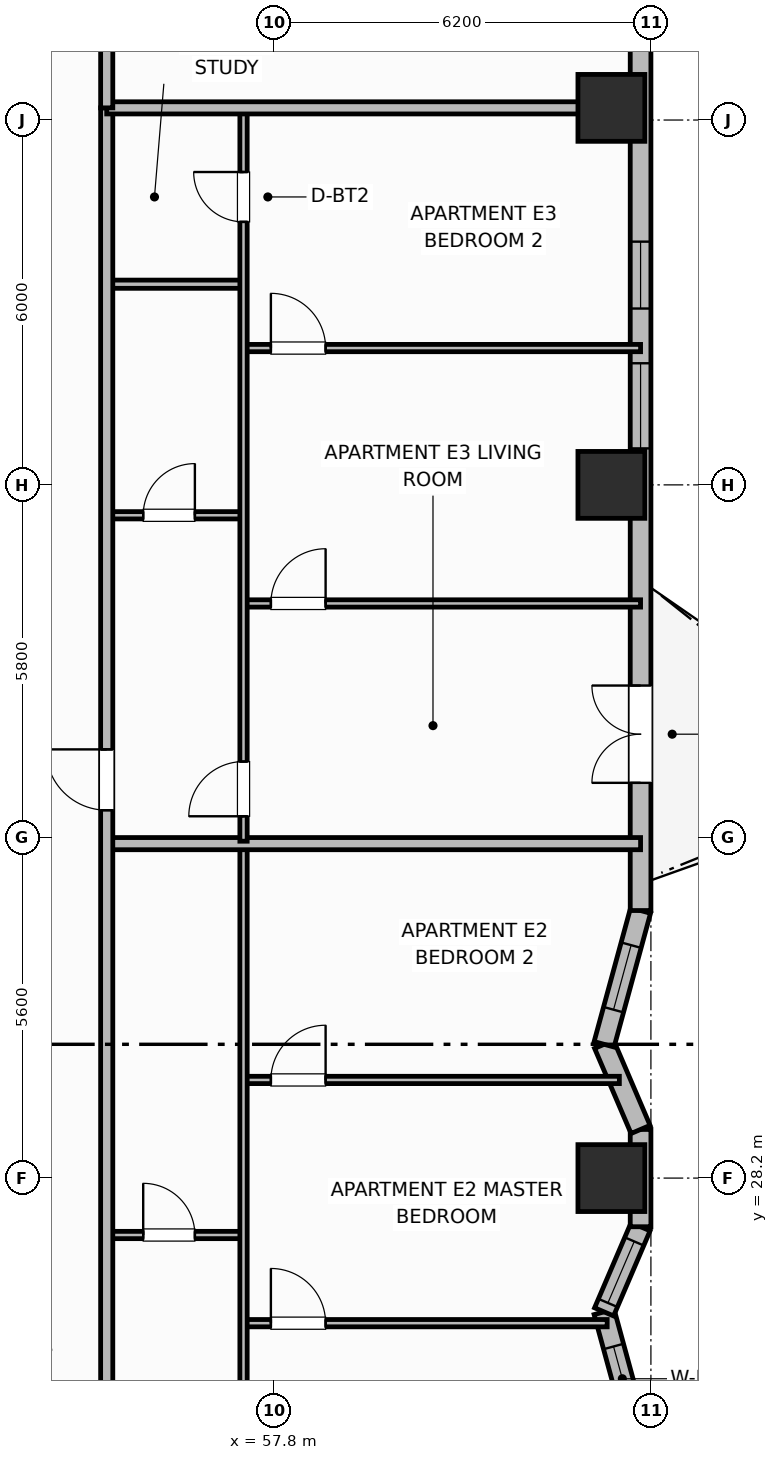
"""IFC4 building model, lengths in metres.
Left out: names, types, materials, properties, quantities, classifications, styles, units other than length and angle.
Written with IfcOpenShell. Run it as: python <this file> out.ifc"""

import sys

from ifc_helpers import new_model, si_unit, direction, frame, frame_2d, origin, origin_2d, place, context, subcontext, project, spatial, rectangle, extrude, element, fill, save


model = new_model("IFC4")
c1 = context("Model", 3, precision=1e-05, world=origin(), true_north=direction((0.0, 1.0)))
c2 = subcontext(c1, "Body", "Model", "MODEL_VIEW")
j1 = project(units=[si_unit("LENGTHUNIT", "METRE"), si_unit("PLANEANGLEUNIT", "RADIAN")], contexts=[c1])
p1 = place(None, origin())
s1 = spatial("IfcSite", under=j1, at=p1, CompositionType="ELEMENT")
p2 = place(p1, origin())
s2 = spatial("IfcBuilding", under=s1, at=p2, CompositionType="ELEMENT")
p3 = place(p2, frame((0.0, 0.0, 88.3)))
s3 = spatial("IfcBuildingStorey", under=s2, at=p3, CompositionType="ELEMENT", Elevation=88.3)
for number, where, z_axis, x_axis in (
    (1, (63.35, 28.2, 0.0), (0.0, 0.0, 1.0), (1.0, 0.0, 0.0)),
    (2, (63.35, 39.6, 0.0), (0.0, 0.0, 1.0), (1.0, 0.0, 0.0)),
    (3, (63.35, 45.8, 0.0), (0.0, 0.0, 1.0), (1.0, 0.0, 0.0)),
):
    element("IfcColumn", number, at=place(p3, frame(where, z_axis=z_axis, x_axis=x_axis)), inside=s3, PredefinedType="COLUMN", context=c2, shape_type="SweptSolid", body=[
        extrude(rectangle(XDim=1.1, YDim=1.1, at=origin_2d()), origin(), (0.0, 0.0, 1.0), 3.7),
    ])
p4 = place(p3, frame((63.83, 23.8, 0.0), z_axis=(0.0, 0.0, 1.0), x_axis=(-0.263162701705, 0.964751466665, 0.0)))
e4 = element("IfcWall", 4, at=p4, inside=s3, PredefinedType="SOLIDWALL", context=c2, shape_type="SweptSolid", body=[
    extrude(rectangle(XDim=2.28, YDim=0.34, at=frame_2d((1.14, 0.0))), origin(), (0.0, 0.0, 1.0), 2.7),
])
p5 = place(p4, frame((0.59, 0.0, 0.89)))
e5 = element("IfcOpeningElement", 5, at=p5, cuts=e4, PredefinedType="OPENING", context=c2, shape_type="SweptSolid", body=[
    extrude(rectangle(XDim=1.1, YDim=1.65, at=frame_2d((0.55, 0.825))), frame((0.0, 0.18, 0.0), z_axis=(0.0, -1.0, 0.0), x_axis=(1.0, 0.0, 0.0)), (0.0, 0.0, 1.0), 0.36),
])
p6 = place(p3, frame((63.23, 26.0, 0.0), z_axis=(0.0, 0.0, 1.0), x_axis=(0.39399667932, 0.919111862988, 0.0)))
e6 = element("IfcWall", 6, at=p6, inside=s3, PredefinedType="SOLIDWALL", context=c2, shape_type="SweptSolid", body=[
    extrude(rectangle(XDim=1.523, YDim=0.34, at=frame_2d((0.762, 0.0))), origin(), (0.0, 0.0, 1.0), 2.7),
])
p7 = place(p6, frame((0.16, 0.0, 0.89)))
e7 = element("IfcOpeningElement", 7, at=p7, cuts=e6, PredefinedType="OPENING", context=c2, shape_type="SweptSolid", body=[
    extrude(rectangle(XDim=1.1, YDim=1.65, at=frame_2d((0.55, 0.825))), frame((0.0, 0.18, 0.0), z_axis=(0.0, -1.0, 0.0), x_axis=(1.0, 0.0, 0.0)), (0.0, 0.0, 1.0), 0.36),
])
p8 = place(p3, frame((63.83, 27.4, 0.0), z_axis=(0.0, 0.0, 1.0), x_axis=(0.0, 1.0, 0.0)))
e8 = element("IfcWall", 8, at=p8, inside=s3, PredefinedType="SOLIDWALL", context=c2, shape_type="SweptSolid", body=[
    extrude(rectangle(XDim=1.6, YDim=0.34, at=frame_2d((0.8, 0.0))), origin(), (0.0, 0.0, 1.0), 2.7),
])
p9 = place(p3, frame((63.83, 29.0, 0.0), z_axis=(0.0, 0.0, 1.0), x_axis=(-0.39399667932, 0.919111862988, 0.0)))
e9 = element("IfcWall", 9, at=p9, inside=s3, PredefinedType="SOLIDWALL", context=c2, shape_type="SweptSolid", body=[
    extrude(rectangle(XDim=1.523, YDim=0.34, at=frame_2d((0.762, 0.0))), origin(), (0.0, 0.0, 1.0), 2.7),
])
p10 = place(p3, frame((63.23, 30.4, 0.0), z_axis=(0.0, 0.0, 1.0), x_axis=(0.263135522356, 0.964758880174, 0.0)))
e10 = element("IfcWall", 10, at=p10, inside=s3, PredefinedType="SOLIDWALL", context=c2, shape_type="SweptSolid", body=[
    extrude(rectangle(XDim=2.281, YDim=0.34, at=frame_2d((1.14, 0.0))), origin(), (0.0, 0.0, 1.0), 2.7),
])
p11 = place(p10, frame((0.59, 0.0, 0.89)))
e11 = element("IfcOpeningElement", 11, at=p11, cuts=e10, PredefinedType="OPENING", context=c2, shape_type="SweptSolid", body=[
    extrude(rectangle(XDim=1.1, YDim=1.65, at=frame_2d((0.55, 0.825))), frame((0.0, 0.18, 0.0), z_axis=(0.0, -1.0, 0.0), x_axis=(1.0, 0.0, 0.0)), (0.0, 0.0, 1.0), 0.36),
])
p12 = place(p3, frame((63.83, 32.6, 0.0), z_axis=(0.0, 0.0, 1.0), x_axis=(0.0, 1.0, 0.0)))
e12 = element("IfcWall", 12, at=p12, inside=s3, PredefinedType="SOLIDWALL", context=c2, shape_type="SweptSolid", body=[
    extrude(rectangle(XDim=14.8, YDim=0.34, at=frame_2d((7.4, 0.0))), origin(), (0.0, 0.0, 1.0), 2.7),
])
p13 = place(p12, frame((2.1, 0.0, 0.0)))
e13 = element("IfcOpeningElement", 13, at=p13, cuts=e12, PredefinedType="OPENING", context=c2, shape_type="SweptSolid", body=[
    extrude(rectangle(XDim=1.6, YDim=2.1, at=frame_2d((0.8, 1.05))), frame((0.0, 0.18, 0.0), z_axis=(0.0, -1.0, 0.0), x_axis=(1.0, 0.0, 0.0)), (0.0, 0.0, 1.0), 0.36),
])
p14 = place(p12, frame((7.6, 0.0, 0.69)))
e14 = element("IfcOpeningElement", 14, at=p14, cuts=e12, PredefinedType="OPENING", context=c2, shape_type="SweptSolid", body=[
    extrude(rectangle(XDim=1.4, YDim=1.85, at=frame_2d((0.7, 0.925))), frame((0.0, 0.18, 0.0), z_axis=(0.0, -1.0, 0.0), x_axis=(1.0, 0.0, 0.0)), (0.0, 0.0, 1.0), 0.36),
])
p15 = place(p12, frame((9.9, 0.0, 0.93)))
e15 = element("IfcOpeningElement", 15, at=p15, cuts=e12, PredefinedType="OPENING", context=c2, shape_type="SweptSolid", body=[
    extrude(rectangle(XDim=1.1, YDim=1.65, at=frame_2d((0.55, 0.825))), frame((0.0, 0.18, 0.0), z_axis=(0.0, -1.0, 0.0), x_axis=(1.0, 0.0, 0.0)), (0.0, 0.0, 1.0), 0.36),
])
p16 = place(p3, frame((55.05, 27.264, 0.0), z_axis=(0.0, 0.0, 1.0), x_axis=(1.0, 0.0, 0.0)))
e16 = element("IfcWall", 16, at=p16, inside=s3, PredefinedType="PARTITIONING", context=c2, shape_type="SweptSolid", body=[
    extrude(rectangle(XDim=2.25, YDim=0.12, at=frame_2d((1.125, 0.0))), origin(), (0.0, 0.0, 1.0), 2.53),
])
p17 = place(p16, frame((0.6, 0.0, 0.0)))
e17 = element("IfcOpeningElement", 17, at=p17, cuts=e16, PredefinedType="OPENING", context=c2, shape_type="SweptSolid", body=[
    extrude(rectangle(XDim=0.85, YDim=2.1, at=frame_2d((0.425, 1.05))), frame((0.0, 0.07, 0.0), z_axis=(0.0, -1.0, 0.0), x_axis=(1.0, 0.0, 0.0)), (0.0, 0.0, 1.0), 0.14),
])
p18 = place(p3, frame((57.3, 25.814, 0.0), z_axis=(0.0, 0.0, 1.0), x_axis=(1.0, 0.0, 0.0)))
e18 = element("IfcWall", 18, at=p18, inside=s3, PredefinedType="PARTITIONING", context=c2, shape_type="SweptSolid", body=[
    extrude(rectangle(XDim=5.981, YDim=0.12, at=frame_2d((2.99, 0.0))), origin(), (0.0, 0.0, 1.0), 2.53),
])
p19 = place(p18, frame((0.45, 0.0, 0.0)))
e19 = element("IfcOpeningElement", 19, at=p19, cuts=e18, PredefinedType="OPENING", context=c2, shape_type="SweptSolid", body=[
    extrude(rectangle(XDim=0.9, YDim=2.1, at=frame_2d((0.45, 1.05))), frame((0.0, 0.07, 0.0), z_axis=(0.0, -1.0, 0.0), x_axis=(1.0, 0.0, 0.0)), (0.0, 0.0, 1.0), 0.14),
])
p20 = place(p3, frame((57.3, 29.814, 0.0), z_axis=(0.0, 0.0, 1.0), x_axis=(1.0, 0.0, 0.0)))
e20 = element("IfcWall", 20, at=p20, inside=s3, PredefinedType="PARTITIONING", context=c2, shape_type="SweptSolid", body=[
    extrude(rectangle(XDim=6.181, YDim=0.12, at=frame_2d((3.091, 0.0))), origin(), (0.0, 0.0, 1.0), 2.53),
])
p21 = place(p20, frame((0.45, 0.0, 0.0)))
e21 = element("IfcOpeningElement", 21, at=p21, cuts=e20, PredefinedType="OPENING", context=c2, shape_type="SweptSolid", body=[
    extrude(rectangle(XDim=0.9, YDim=2.1, at=frame_2d((0.45, 1.05))), frame((0.0, 0.07, 0.0), z_axis=(0.0, -1.0, 0.0), x_axis=(1.0, 0.0, 0.0)), (0.0, 0.0, 1.0), 0.14),
])
p22 = place(p3, frame((57.3, 21.904, 0.0), z_axis=(0.0, 0.0, 1.0), x_axis=(0.0, 1.0, 0.0)))
e22 = element("IfcWall", 22, at=p22, inside=s3, PredefinedType="PARTITIONING", context=c2, shape_type="SweptSolid", body=[
    extrude(rectangle(XDim=11.756, YDim=0.12, at=frame_2d((5.878, 0.0))), origin(), (0.0, 0.0, 1.0), 2.53),
])
p23 = place(p22, frame((0.41, 0.0, 0.0)))
e23 = element("IfcOpeningElement", 23, at=p23, cuts=e22, PredefinedType="OPENING", context=c2, shape_type="SweptSolid", body=[
    extrude(rectangle(XDim=0.9, YDim=2.1, at=frame_2d((0.45, 1.05))), frame((0.0, 0.07, 0.0), z_axis=(0.0, -1.0, 0.0), x_axis=(1.0, 0.0, 0.0)), (0.0, 0.0, 1.0), 0.14),
])
p24 = place(p3, frame((55.05, 33.7, 0.0), z_axis=(0.0, 0.0, 1.0), x_axis=(1.0, 0.0, 0.0)))
e24 = element("IfcWall", 24, at=p24, inside=s3, PredefinedType="PARTITIONING", context=c2, shape_type="SweptSolid", body=[
    extrude(rectangle(XDim=8.78, YDim=0.2, at=frame_2d((4.39, 0.0))), origin(), (0.0, 0.0, 1.0), 2.53),
])
p25 = place(p3, frame((55.05, 39.1, 0.0), z_axis=(0.0, 0.0, 1.0), x_axis=(1.0, 0.0, 0.0)))
e25 = element("IfcWall", 25, at=p25, inside=s3, PredefinedType="PARTITIONING", context=c2, shape_type="SweptSolid", body=[
    extrude(rectangle(XDim=2.25, YDim=0.12, at=frame_2d((1.125, 0.0))), origin(), (0.0, 0.0, 1.0), 2.53),
])
p26 = place(p25, frame((0.6, 0.0, 0.0)))
e26 = element("IfcOpeningElement", 26, at=p26, cuts=e25, PredefinedType="OPENING", context=c2, shape_type="SweptSolid", body=[
    extrude(rectangle(XDim=0.85, YDim=2.1, at=frame_2d((0.425, 1.05))), frame((0.0, 0.07, 0.0), z_axis=(0.0, -1.0, 0.0), x_axis=(1.0, 0.0, 0.0)), (0.0, 0.0, 1.0), 0.14),
])
p27 = place(p3, frame((55.05, 42.9, 0.0), z_axis=(0.0, 0.0, 1.0), x_axis=(1.0, 0.0, 0.0)))
e27 = element("IfcWall", 27, at=p27, inside=s3, PredefinedType="PARTITIONING", context=c2, shape_type="SweptSolid", body=[
    extrude(rectangle(XDim=2.25, YDim=0.135, at=frame_2d((1.125, 0.0))), origin(), (0.0, 0.0, 1.0), 2.53),
])
p28 = place(p3, frame((57.3, 37.65, 0.0), z_axis=(0.0, 0.0, 1.0), x_axis=(1.0, 0.0, 0.0)))
e28 = element("IfcWall", 28, at=p28, inside=s3, PredefinedType="PARTITIONING", context=c2, shape_type="SweptSolid", body=[
    extrude(rectangle(XDim=6.53, YDim=0.12, at=frame_2d((3.265, 0.0))), origin(), (0.0, 0.0, 1.0), 2.53),
])
p29 = place(p28, frame((0.45, 0.0, 0.0)))
e29 = element("IfcOpeningElement", 29, at=p29, cuts=e28, PredefinedType="OPENING", context=c2, shape_type="SweptSolid", body=[
    extrude(rectangle(XDim=0.9, YDim=2.1, at=frame_2d((0.45, 1.05))), frame((0.0, 0.07, 0.0), z_axis=(0.0, -1.0, 0.0), x_axis=(1.0, 0.0, 0.0)), (0.0, 0.0, 1.0), 0.14),
])
p30 = place(p3, frame((57.3, 41.85, 0.0), z_axis=(0.0, 0.0, 1.0), x_axis=(1.0, 0.0, 0.0)))
e30 = element("IfcWall", 30, at=p30, inside=s3, PredefinedType="PARTITIONING", context=c2, shape_type="SweptSolid", body=[
    extrude(rectangle(XDim=6.53, YDim=0.12, at=frame_2d((3.265, 0.0))), origin(), (0.0, 0.0, 1.0), 2.53),
])
p31 = place(p30, frame((0.45, 0.0, 0.0)))
e31 = element("IfcOpeningElement", 31, at=p31, cuts=e30, PredefinedType="OPENING", context=c2, shape_type="SweptSolid", body=[
    extrude(rectangle(XDim=0.9, YDim=2.1, at=frame_2d((0.45, 1.05))), frame((0.0, 0.07, 0.0), z_axis=(0.0, -1.0, 0.0), x_axis=(1.0, 0.0, 0.0)), (0.0, 0.0, 1.0), 0.14),
])
p32 = place(p3, frame((57.3, 33.74, 0.0), z_axis=(0.0, 0.0, 1.0), x_axis=(0.0, 1.0, 0.0)))
e32 = element("IfcWall", 32, at=p32, inside=s3, PredefinedType="PARTITIONING", context=c2, shape_type="SweptSolid", body=[
    extrude(rectangle(XDim=12.02, YDim=0.12, at=frame_2d((6.01, 0.0))), origin(), (0.0, 0.0, 1.0), 2.53),
])
p33 = place(p32, frame((0.41, 0.0, 0.0)))
e33 = element("IfcOpeningElement", 33, at=p33, cuts=e32, PredefinedType="OPENING", context=c2, shape_type="SweptSolid", body=[
    extrude(rectangle(XDim=0.9, YDim=2.1, at=frame_2d((0.45, 1.05))), frame((0.0, 0.07, 0.0), z_axis=(0.0, -1.0, 0.0), x_axis=(1.0, 0.0, 0.0)), (0.0, 0.0, 1.0), 0.14),
])
p34 = place(p32, frame((10.185, 0.0, 0.0)))
e34 = element("IfcOpeningElement", 34, at=p34, cuts=e32, PredefinedType="OPENING", context=c2, shape_type="SweptSolid", body=[
    extrude(rectangle(XDim=0.82, YDim=2.08, at=frame_2d((0.41, 1.04))), frame((0.0, 0.07, 0.0), z_axis=(0.0, -1.0, 0.0), x_axis=(1.0, 0.0, 0.0)), (0.0, 0.0, 1.0), 0.14),
])
p35 = place(p3, frame((55.05, 10.6, 0.0), z_axis=(0.0, 0.0, 1.0), x_axis=(0.0, 1.0, 0.0)))
e35 = element("IfcWall", 35, at=p35, inside=s3, PredefinedType="PARTITIONING", context=c2, shape_type="SweptSolid", body=[
    extrude(rectangle(XDim=35.2, YDim=0.2, at=frame_2d((17.6, 0.0))), origin(), (0.0, 0.0, 1.0), 2.53),
])
p36 = place(p35, frame((2.65, 0.0, 0.0)))
e36 = element("IfcOpeningElement", 36, at=p36, cuts=e35, PredefinedType="OPENING", context=c2, shape_type="SweptSolid", body=[
    extrude(rectangle(XDim=1.0, YDim=2.15, at=frame_2d((0.5, 1.075))), frame((0.0, 0.11, 0.0), z_axis=(0.0, -1.0, 0.0), x_axis=(1.0, 0.0, 0.0)), (0.0, 0.0, 1.0), 0.22),
])
p37 = place(p35, frame((11.814, 0.0, 0.0)))
e37 = element("IfcOpeningElement", 37, at=p37, cuts=e35, PredefinedType="OPENING", context=c2, shape_type="SweptSolid", body=[
    extrude(rectangle(XDim=1.0, YDim=2.15, at=frame_2d((0.5, 1.075))), frame((0.0, 0.11, 0.0), z_axis=(0.0, -1.0, 0.0), x_axis=(1.0, 0.0, 0.0)), (0.0, 0.0, 1.0), 0.22),
])
p38 = place(p35, frame((23.65, 0.0, 0.0)))
e38 = element("IfcOpeningElement", 38, at=p38, cuts=e35, PredefinedType="OPENING", context=c2, shape_type="SweptSolid", body=[
    extrude(rectangle(XDim=1.0, YDim=2.15, at=frame_2d((0.5, 1.075))), frame((0.0, 0.11, 0.0), z_axis=(0.0, -1.0, 0.0), x_axis=(1.0, 0.0, 0.0)), (0.0, 0.0, 1.0), 0.22),
])
p39 = place(p3, frame((55.05, 45.8, 0.0), z_axis=(0.0, 0.0, 1.0), x_axis=(1.0, 0.0, 0.0)))
e39 = element("IfcWall", 39, at=p39, inside=s3, PredefinedType="PARTITIONING", context=c2, shape_type="SweptSolid", body=[
    extrude(rectangle(XDim=8.36, YDim=0.2, at=frame_2d((4.18, 0.0))), origin(), (0.0, 0.0, 1.0), 2.53),
])
p40 = place(p3, frame((55.05, 45.8, 0.0), z_axis=(0.0, 0.0, 1.0), x_axis=(0.0, 1.0, 0.0)))
e40 = element("IfcWall", 40, at=p40, inside=s3, PredefinedType="PARTITIONING", context=c2, shape_type="SweptSolid", body=[
    extrude(rectangle(XDim=5.63, YDim=0.2, at=frame_2d((2.815, 0.0))), origin(), (0.0, 0.0, 1.0), 2.53),
])
p41 = place(p5, origin())
e41 = element("IfcWindow", 41, at=p41, inside=s3, PartitioningType="SINGLE_PANEL", PredefinedType="WINDOW", context=c2, shape_type="SweptSolid", body=[
    extrude(rectangle(XDim=1.1, YDim=1.65, at=frame_2d((0.55, 0.825))), frame((0.0, 0.03, 0.0), z_axis=(0.0, -1.0, 0.0), x_axis=(1.0, 0.0, 0.0)), (0.0, 0.0, 1.0), 0.06),
])
fill(e5, e41)
p42 = place(p7, origin())
e42 = element("IfcWindow", 42, at=p42, inside=s3, PartitioningType="SINGLE_PANEL", PredefinedType="WINDOW", context=c2, shape_type="SweptSolid", body=[
    extrude(rectangle(XDim=1.1, YDim=1.65, at=frame_2d((0.55, 0.825))), frame((0.0, 0.03, 0.0), z_axis=(0.0, -1.0, 0.0), x_axis=(1.0, 0.0, 0.0)), (0.0, 0.0, 1.0), 0.06),
])
fill(e7, e42)
p43 = place(p11, origin())
e43 = element("IfcWindow", 43, at=p43, inside=s3, PartitioningType="SINGLE_PANEL", PredefinedType="WINDOW", context=c2, shape_type="SweptSolid", body=[
    extrude(rectangle(XDim=1.1, YDim=1.65, at=frame_2d((0.55, 0.825))), frame((0.0, 0.03, 0.0), z_axis=(0.0, -1.0, 0.0), x_axis=(1.0, 0.0, 0.0)), (0.0, 0.0, 1.0), 0.06),
])
fill(e11, e43)
p44 = place(p13, origin())
e44 = element("IfcDoor", 44, at=p44, inside=s3, OperationType="DOUBLE_DOOR_SINGLE_SWING", PredefinedType="DOOR", context=c2, shape_type="SweptSolid", body=[
    extrude(rectangle(XDim=1.6, YDim=2.1, at=frame_2d((0.8, 1.05))), frame((0.0, 0.025, 0.0), z_axis=(0.0, -1.0, 0.0), x_axis=(1.0, 0.0, 0.0)), (0.0, 0.0, 1.0), 0.05),
])
fill(e13, e44)
p45 = place(p14, origin())
e45 = element("IfcWindow", 45, at=p45, inside=s3, PartitioningType="SINGLE_PANEL", PredefinedType="WINDOW", context=c2, shape_type="SweptSolid", body=[
    extrude(rectangle(XDim=1.4, YDim=1.85, at=frame_2d((0.7, 0.925))), frame((0.0, 0.03, 0.0), z_axis=(0.0, -1.0, 0.0), x_axis=(1.0, 0.0, 0.0)), (0.0, 0.0, 1.0), 0.06),
])
fill(e14, e45)
p46 = place(p15, origin())
e46 = element("IfcWindow", 46, at=p46, inside=s3, PartitioningType="SINGLE_PANEL", PredefinedType="WINDOW", context=c2, shape_type="SweptSolid", body=[
    extrude(rectangle(XDim=1.1, YDim=1.65, at=frame_2d((0.55, 0.825))), frame((0.0, 0.03, 0.0), z_axis=(0.0, -1.0, 0.0), x_axis=(1.0, 0.0, 0.0)), (0.0, 0.0, 1.0), 0.06),
])
fill(e15, e46)
p47 = place(p17, origin())
e47 = element("IfcDoor", 47, at=p47, inside=s3, OperationType="SINGLE_SWING_LEFT", PredefinedType="DOOR", context=c2, shape_type="SweptSolid", body=[
    extrude(rectangle(XDim=0.85, YDim=2.1, at=frame_2d((0.425, 1.05))), frame((0.0, 0.025, 0.0), z_axis=(0.0, -1.0, 0.0), x_axis=(1.0, 0.0, 0.0)), (0.0, 0.0, 1.0), 0.05),
])
fill(e17, e47)
p48 = place(p19, origin())
e48 = element("IfcDoor", 48, at=p48, inside=s3, OperationType="SINGLE_SWING_LEFT", PredefinedType="DOOR", context=c2, shape_type="SweptSolid", body=[
    extrude(rectangle(XDim=0.9, YDim=2.1, at=frame_2d((0.45, 1.05))), frame((0.0, 0.025, 0.0), z_axis=(0.0, -1.0, 0.0), x_axis=(1.0, 0.0, 0.0)), (0.0, 0.0, 1.0), 0.05),
])
fill(e19, e48)
p49 = place(p21, origin())
e49 = element("IfcDoor", 49, at=p49, inside=s3, OperationType="SINGLE_SWING_RIGHT", PredefinedType="DOOR", context=c2, shape_type="SweptSolid", body=[
    extrude(rectangle(XDim=0.9, YDim=2.1, at=frame_2d((0.45, 1.05))), frame((0.0, 0.025, 0.0), z_axis=(0.0, -1.0, 0.0), x_axis=(1.0, 0.0, 0.0)), (0.0, 0.0, 1.0), 0.05),
])
fill(e21, e49)
p50 = place(p26, origin())
e50 = element("IfcDoor", 50, at=p50, inside=s3, OperationType="SINGLE_SWING_RIGHT", PredefinedType="DOOR", context=c2, shape_type="SweptSolid", body=[
    extrude(rectangle(XDim=0.85, YDim=2.1, at=frame_2d((0.425, 1.05))), frame((0.0, 0.025, 0.0), z_axis=(0.0, -1.0, 0.0), x_axis=(1.0, 0.0, 0.0)), (0.0, 0.0, 1.0), 0.05),
])
fill(e26, e50)
p51 = place(p29, origin())
e51 = element("IfcDoor", 51, at=p51, inside=s3, OperationType="SINGLE_SWING_RIGHT", PredefinedType="DOOR", context=c2, shape_type="SweptSolid", body=[
    extrude(rectangle(XDim=0.9, YDim=2.1, at=frame_2d((0.45, 1.05))), frame((0.0, 0.025, 0.0), z_axis=(0.0, -1.0, 0.0), x_axis=(1.0, 0.0, 0.0)), (0.0, 0.0, 1.0), 0.05),
])
fill(e29, e51)
p52 = place(p31, origin())
e52 = element("IfcDoor", 52, at=p52, inside=s3, OperationType="SINGLE_SWING_LEFT", PredefinedType="DOOR", context=c2, shape_type="SweptSolid", body=[
    extrude(rectangle(XDim=0.9, YDim=2.1, at=frame_2d((0.45, 1.05))), frame((0.0, 0.025, 0.0), z_axis=(0.0, -1.0, 0.0), x_axis=(1.0, 0.0, 0.0)), (0.0, 0.0, 1.0), 0.05),
])
fill(e31, e52)
p53 = place(p33, origin())
e53 = element("IfcDoor", 53, at=p53, inside=s3, OperationType="SINGLE_SWING_LEFT", PredefinedType="DOOR", context=c2, shape_type="SweptSolid", body=[
    extrude(rectangle(XDim=0.9, YDim=2.1, at=frame_2d((0.45, 1.05))), frame((0.0, 0.025, 0.0), z_axis=(0.0, -1.0, 0.0), x_axis=(1.0, 0.0, 0.0)), (0.0, 0.0, 1.0), 0.05),
])
fill(e33, e53)
p54 = place(p34, origin())
e54 = element("IfcDoor", 54, at=p54, inside=s3, OperationType="SINGLE_SWING_RIGHT", PredefinedType="DOOR", context=c2, shape_type="SweptSolid", body=[
    extrude(rectangle(XDim=0.82, YDim=2.08, at=frame_2d((0.41, 1.04))), frame((0.0, 0.025, 0.0), z_axis=(0.0, -1.0, 0.0), x_axis=(1.0, 0.0, 0.0)), (0.0, 0.0, 1.0), 0.05),
])
fill(e34, e54)
p55 = place(p38, origin())
e55 = element("IfcDoor", 55, at=p55, inside=s3, OperationType="SINGLE_SWING_RIGHT", PredefinedType="DOOR", context=c2, shape_type="SweptSolid", body=[
    extrude(rectangle(XDim=1.0, YDim=2.15, at=frame_2d((0.5, 1.075))), frame((0.0, 0.025, 0.0), z_axis=(0.0, -1.0, 0.0), x_axis=(1.0, 0.0, 0.0)), (0.0, 0.0, 1.0), 0.05),
])
fill(e38, e55)
save(model, sys.argv[1])
